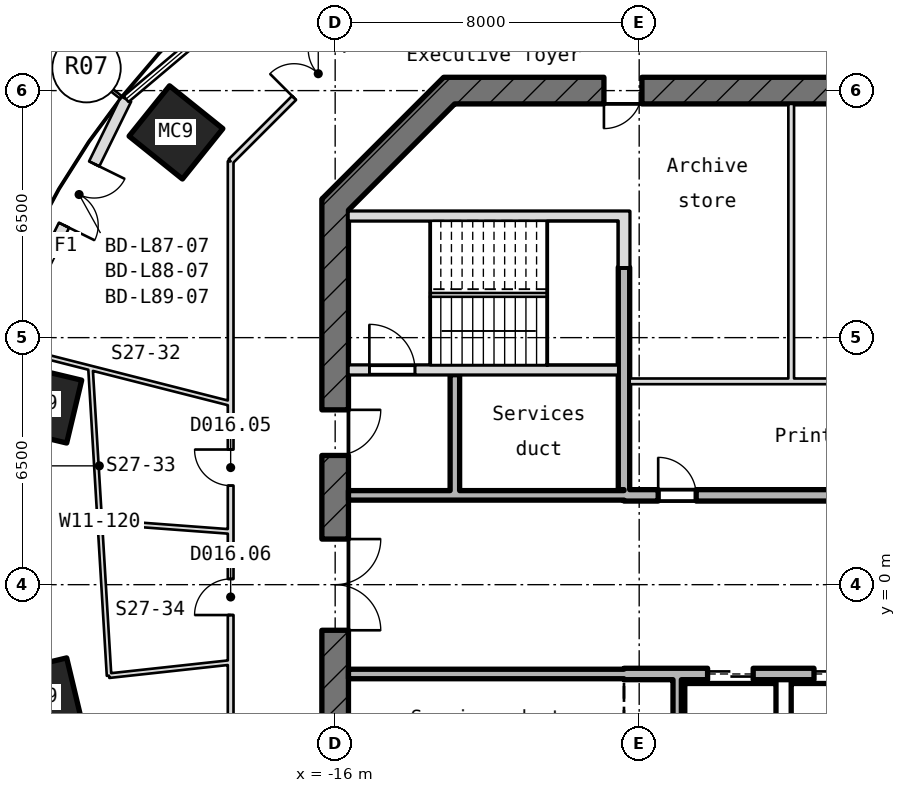
"""IFC4 building model, lengths in metres.
Left out: names, types, materials, properties, quantities, classifications, styles, units other than length and angle.
Written with IfcOpenShell. Run it as: python <this file> out.ifc"""

import sys

from ifc_helpers import new_model, si_unit, direction, frame, frame_2d, origin, origin_2d, place, context, subcontext, project, spatial, rectangle, hollow_rectangle, extrude, element, fill, save


model = new_model("IFC4")
c1 = context("Model", 3, precision=1e-05, world=origin(), true_north=direction((0.0, 1.0)))
c2 = subcontext(c1, "Body", "Model", "MODEL_VIEW")
j1 = project(units=[si_unit("LENGTHUNIT", "METRE"), si_unit("PLANEANGLEUNIT", "RADIAN")], contexts=[c1])
p1 = place(None, origin())
s1 = spatial("IfcSite", under=j1, at=p1, CompositionType="ELEMENT")
p2 = place(p1, origin())
s2 = spatial("IfcBuilding", under=s1, at=p2, CompositionType="ELEMENT")
p3 = place(p2, frame((0.0, 0.0, 384.1)))
s3 = spatial("IfcBuildingStorey", under=s2, at=p3, CompositionType="ELEMENT", Elevation=384.1)
for number, where, z_axis, x_axis in (
    (1, (-20.189, 11.9, -0.18), (0.0, 0.0, 1.0), (0.626, 0.78, 0.0)),
    (2, (-23.743, 4.763, -0.18), (0.0, 0.0, 1.0), (0.233, 0.973, 0.0)),
    (3, (-23.743, -2.963, -0.18), (0.0, 0.0, 1.0), (-0.233, 0.973, 0.0)),
):
    element("IfcColumn", number, at=place(p3, frame(where, z_axis=z_axis, x_axis=x_axis)), inside=s3, PredefinedType="COLUMN", context=c2, shape_type="SweptSolid", body=[
        extrude(hollow_rectangle(XDim=1.7, YDim=1.8, WallThickness=0.05, at=origin_2d()), origin(), (0.0, 0.0, 1.0), 4.15),
    ])
p4 = place(p3, frame((-21.503, 12.778, 0.0), z_axis=(0.0, 0.0, 1.0), x_axis=(-0.441245353493, -0.897386504256, 0.0)))
e4 = element("IfcWall", 4, at=p4, inside=s3, PredefinedType="SOLIDWALL", context=c2, shape_type="SweptSolid", body=[
    extrude(rectangle(XDim=8.588, YDim=0.3, at=frame_2d((4.294, 0.0))), origin(), (0.0, 0.0, 1.0), 3.97),
])
p5 = place(p4, frame((1.9, 0.0, 0.0)))
e5 = element("IfcOpeningElement", 5, at=p5, cuts=e4, PredefinedType="OPENING", context=c2, shape_type="SweptSolid", body=[
    extrude(rectangle(XDim=1.8, YDim=2.4, at=frame_2d((0.9, 1.2))), frame((0.0, 0.16, 0.0), z_axis=(0.0, -1.0, 0.0), x_axis=(1.0, 0.0, 0.0)), (0.0, 0.0, 1.0), 0.32),
])
p6 = place(p4, frame((4.3, 0.0, 0.9)))
e6 = element("IfcOpeningElement", 6, at=p6, cuts=e4, PredefinedType="OPENING", context=c2, shape_type="SweptSolid", body=[
    extrude(rectangle(XDim=1.6, YDim=1.5, at=frame_2d((0.8, 0.75))), frame((0.0, 0.16, 0.0), z_axis=(0.0, -1.0, 0.0), x_axis=(1.0, 0.0, 0.0)), (0.0, 0.0, 1.0), 0.32),
])
p7 = place(p3, frame((-25.292, -3.271, 0.0), z_axis=(0.0, 0.0, 1.0), x_axis=(0.441245353493, -0.897386504256, 0.0)))
e7 = element("IfcWall", 7, at=p7, inside=s3, PredefinedType="SOLIDWALL", context=c2, shape_type="SweptSolid", body=[
    extrude(rectangle(XDim=8.588, YDim=0.3, at=frame_2d((4.294, 0.0))), origin(), (0.0, 0.0, 1.0), 3.97),
])
p8 = place(p7, frame((1.9, 0.0, 0.0)))
e8 = element("IfcOpeningElement", 8, at=p8, cuts=e7, PredefinedType="OPENING", context=c2, shape_type="SweptSolid", body=[
    extrude(rectangle(XDim=1.8, YDim=2.4, at=frame_2d((0.9, 1.2))), frame((0.0, 0.16, 0.0), z_axis=(0.0, -1.0, 0.0), x_axis=(1.0, 0.0, 0.0)), (0.0, 0.0, 1.0), 0.32),
])
p9 = place(p7, frame((4.3, 0.0, 0.9)))
e9 = element("IfcOpeningElement", 9, at=p9, cuts=e7, PredefinedType="OPENING", context=c2, shape_type="SweptSolid", body=[
    extrude(rectangle(XDim=1.6, YDim=1.5, at=frame_2d((0.8, 0.75))), frame((0.0, 0.16, 0.0), z_axis=(0.0, -1.0, 0.0), x_axis=(1.0, 0.0, 0.0)), (0.0, 0.0, 1.0), 0.32),
])
p10 = place(p3, frame((13.145, 13.0, -0.18), z_axis=(0.0, 0.0, 1.0), x_axis=(-1.0, 0.0, 0.0)))
e10 = element("IfcWall", 10, at=p10, inside=s3, PredefinedType="SHEAR", context=c2, shape_type="SweptSolid", body=[
    extrude(rectangle(XDim=26.29, YDim=0.7, at=frame_2d((13.145, 0.0))), origin(), (0.0, 0.0, 1.0), 4.15),
])
p11 = place(p10, frame((21.073, 0.0, 0.18)))
e11 = element("IfcOpeningElement", 11, at=p11, cuts=e10, PredefinedType="OPENING", context=c2, shape_type="SweptSolid", body=[
    extrude(rectangle(XDim=1.0, YDim=2.1, at=frame_2d((0.5, 1.05))), frame((0.0, 0.36, 0.0), z_axis=(0.0, -1.0, 0.0), x_axis=(1.0, 0.0, 0.0)), (0.0, 0.0, 1.0), 0.72),
])
p12 = place(p10, frame((13.645, 0.0, 0.18)))
e12 = element("IfcOpeningElement", 12, at=p12, cuts=e10, PredefinedType="OPENING", context=c2, shape_type="SweptSolid", body=[
    extrude(rectangle(XDim=1.0, YDim=2.1, at=frame_2d((0.5, 1.05))), frame((0.0, 0.36, 0.0), z_axis=(0.0, -1.0, 0.0), x_axis=(1.0, 0.0, 0.0)), (0.0, 0.0, 1.0), 0.72),
])
p13 = place(p10, frame((7.395, 0.0, 0.18)))
e13 = element("IfcOpeningElement", 13, at=p13, cuts=e10, PredefinedType="OPENING", context=c2, shape_type="SweptSolid", body=[
    extrude(rectangle(XDim=1.0, YDim=2.1, at=frame_2d((0.5, 1.05))), frame((0.0, 0.36, 0.0), z_axis=(0.0, -1.0, 0.0), x_axis=(1.0, 0.0, 0.0)), (0.0, 0.0, 1.0), 0.72),
])
p14 = place(p10, frame((2.4, 0.0, 0.18)))
e14 = element("IfcOpeningElement", 14, at=p14, cuts=e10, PredefinedType="OPENING", context=c2, shape_type="SweptSolid", body=[
    extrude(rectangle(XDim=1.0, YDim=2.1, at=frame_2d((0.5, 1.05))), frame((0.0, 0.36, 0.0), z_axis=(0.0, -1.0, 0.0), x_axis=(1.0, 0.0, 0.0)), (0.0, 0.0, 1.0), 0.72),
])
p15 = place(p3, frame((-12.897, 13.103, -0.18), z_axis=(0.0, 0.0, 1.0), x_axis=(-0.707106781187, -0.707106781187, 0.0)))
e15 = element("IfcWall", 15, at=p15, inside=s3, PredefinedType="SHEAR", context=c2, shape_type="SweptSolid", body=[
    extrude(rectangle(XDim=4.533, YDim=0.7, at=frame_2d((2.266, 0.0))), origin(), (0.0, 0.0, 1.0), 4.15),
])
p16 = place(p3, frame((-16.0, 10.145, -0.18), z_axis=(0.0, 0.0, 1.0), x_axis=(0.0, -1.0, 0.0)))
e16 = element("IfcWall", 16, at=p16, inside=s3, PredefinedType="SHEAR", context=c2, shape_type="SweptSolid", body=[
    extrude(rectangle(XDim=20.29, YDim=0.7, at=frame_2d((10.145, 0.0))), origin(), (0.0, 0.0, 1.0), 4.15),
])
p17 = place(p16, frame((8.945, 0.0, 0.18)))
e17 = element("IfcOpeningElement", 17, at=p17, cuts=e16, PredefinedType="OPENING", context=c2, shape_type="SweptSolid", body=[
    extrude(rectangle(XDim=2.4, YDim=2.1, at=frame_2d((1.2, 1.05))), frame((0.0, 0.36, 0.0), z_axis=(0.0, -1.0, 0.0), x_axis=(1.0, 0.0, 0.0)), (0.0, 0.0, 1.0), 0.72),
])
p18 = place(p16, frame((5.545, 0.0, 0.18)))
e18 = element("IfcOpeningElement", 18, at=p18, cuts=e16, PredefinedType="OPENING", context=c2, shape_type="SweptSolid", body=[
    extrude(rectangle(XDim=1.2, YDim=2.1, at=frame_2d((0.6, 1.05))), frame((0.0, 0.36, 0.0), z_axis=(0.0, -1.0, 0.0), x_axis=(1.0, 0.0, 0.0)), (0.0, 0.0, 1.0), 0.72),
])
p19 = place(p3, frame((-15.65, -2.35, 0.0), z_axis=(0.0, 0.0, 1.0), x_axis=(1.0, 0.0, 0.0)))
e19 = element("IfcWall", 19, at=p19, inside=s3, PredefinedType="STANDARD", context=c2, shape_type="SweptSolid", body=[
    extrude(rectangle(XDim=7.25, YDim=0.25, at=frame_2d((3.625, 0.0))), origin(), (0.0, 0.0, 1.0), 3.97),
])
p20 = place(p3, frame((-8.4, -2.35, -0.18), z_axis=(0.0, 0.0, 1.0), x_axis=(1.0, 0.0, 0.0)))
e20 = element("IfcWall", 20, at=p20, inside=s3, PredefinedType="SHEAR", context=c2, shape_type="SweptSolid", body=[
    extrude(rectangle(XDim=16.8, YDim=0.3, at=frame_2d((8.4, 0.0))), origin(), (0.0, 0.0, 1.0), 4.15),
])
p21 = place(p20, frame((2.2, 0.0, 0.18)))
e21 = element("IfcOpeningElement", 21, at=p21, cuts=e20, PredefinedType="OPENING", context=c2, shape_type="SweptSolid", body=[
    extrude(rectangle(XDim=1.2, YDim=2.1, at=frame_2d((0.6, 1.05))), frame((0.0, 0.16, 0.0), z_axis=(0.0, -1.0, 0.0), x_axis=(1.0, 0.0, 0.0)), (0.0, 0.0, 1.0), 0.32),
])
p22 = place(p20, frame((5.0, 0.0, 0.18)))
e22 = element("IfcOpeningElement", 22, at=p22, cuts=e20, PredefinedType="OPENING", context=c2, shape_type="SweptSolid", body=[
    extrude(rectangle(XDim=1.2, YDim=2.1, at=frame_2d((0.6, 1.05))), frame((0.0, 0.16, 0.0), z_axis=(0.0, -1.0, 0.0), x_axis=(1.0, 0.0, 0.0)), (0.0, 0.0, 1.0), 0.32),
])
p23 = place(p20, frame((7.8, 0.0, 0.18)))
e23 = element("IfcOpeningElement", 23, at=p23, cuts=e20, PredefinedType="OPENING", context=c2, shape_type="SweptSolid", body=[
    extrude(rectangle(XDim=1.2, YDim=2.1, at=frame_2d((0.6, 1.05))), frame((0.0, 0.16, 0.0), z_axis=(0.0, -1.0, 0.0), x_axis=(1.0, 0.0, 0.0)), (0.0, 0.0, 1.0), 0.32),
])
p24 = place(p20, frame((10.6, 0.0, 0.18)))
e24 = element("IfcOpeningElement", 24, at=p24, cuts=e20, PredefinedType="OPENING", context=c2, shape_type="SweptSolid", body=[
    extrude(rectangle(XDim=1.2, YDim=2.1, at=frame_2d((0.6, 1.05))), frame((0.0, 0.16, 0.0), z_axis=(0.0, -1.0, 0.0), x_axis=(1.0, 0.0, 0.0)), (0.0, 0.0, 1.0), 0.32),
])
p25 = place(p20, frame((13.4, 0.0, 0.18)))
e25 = element("IfcOpeningElement", 25, at=p25, cuts=e20, PredefinedType="OPENING", context=c2, shape_type="SweptSolid", body=[
    extrude(rectangle(XDim=1.2, YDim=2.1, at=frame_2d((0.6, 1.05))), frame((0.0, 0.16, 0.0), z_axis=(0.0, -1.0, 0.0), x_axis=(1.0, 0.0, 0.0)), (0.0, 0.0, 1.0), 0.32),
])
p26 = place(p3, frame((-15.65, 2.35, 0.0), z_axis=(0.0, 0.0, 1.0), x_axis=(1.0, 0.0, 0.0)))
e26 = element("IfcWall", 26, at=p26, inside=s3, PredefinedType="STANDARD", context=c2, shape_type="SweptSolid", body=[
    extrude(rectangle(XDim=7.25, YDim=0.25, at=frame_2d((3.625, 0.0))), origin(), (0.0, 0.0, 1.0), 3.97),
])
p27 = place(p3, frame((-8.4, 2.35, -0.18), z_axis=(0.0, 0.0, 1.0), x_axis=(1.0, 0.0, 0.0)))
e27 = element("IfcWall", 27, at=p27, inside=s3, PredefinedType="SHEAR", context=c2, shape_type="SweptSolid", body=[
    extrude(rectangle(XDim=16.8, YDim=0.3, at=frame_2d((8.4, 0.0))), origin(), (0.0, 0.0, 1.0), 4.15),
])
p28 = place(p27, frame((0.9, 0.0, 0.18)))
e28 = element("IfcOpeningElement", 28, at=p28, cuts=e27, PredefinedType="OPENING", context=c2, shape_type="SweptSolid", body=[
    extrude(rectangle(XDim=1.0, YDim=2.1, at=frame_2d((0.5, 1.05))), frame((0.0, 0.16, 0.0), z_axis=(0.0, -1.0, 0.0), x_axis=(1.0, 0.0, 0.0)), (0.0, 0.0, 1.0), 0.32),
])
p29 = place(p27, frame((14.9, 0.0, 0.18)))
e29 = element("IfcOpeningElement", 29, at=p29, cuts=e27, PredefinedType="OPENING", context=c2, shape_type="SweptSolid", body=[
    extrude(rectangle(XDim=1.0, YDim=2.1, at=frame_2d((0.5, 1.05))), frame((0.0, 0.16, 0.0), z_axis=(0.0, -1.0, 0.0), x_axis=(1.0, 0.0, 0.0)), (0.0, 0.0, 1.0), 0.32),
])
p30 = place(p3, frame((-8.25, 5.35, 0.0), z_axis=(0.0, 0.0, 1.0), x_axis=(1.0, 0.0, 0.0)))
e30 = element("IfcWall", 30, at=p30, inside=s3, PredefinedType="PARTITIONING", context=c2, shape_type="SweptSolid", body=[
    extrude(rectangle(XDim=11.05, YDim=0.15, at=frame_2d((5.525, 0.0))), origin(), (0.0, 0.0, 1.0), 3.97),
])
p31 = place(p3, frame((-15.65, 5.65, -0.18), z_axis=(0.0, 0.0, 1.0), x_axis=(1.0, 0.0, 0.0)))
e31 = element("IfcWall", 31, at=p31, inside=s3, PredefinedType="SHEAR", context=c2, shape_type="SweptSolid", body=[
    extrude(rectangle(XDim=7.1, YDim=0.25, at=frame_2d((3.55, 0.0))), origin(), (0.0, 0.0, 1.0), 4.15),
])
p32 = place(p31, frame((0.55, 0.0, 0.18)))
e32 = element("IfcOpeningElement", 32, at=p32, cuts=e31, PredefinedType="OPENING", context=c2, shape_type="SweptSolid", body=[
    extrude(rectangle(XDim=1.2, YDim=2.1, at=frame_2d((0.6, 1.05))), frame((0.0, 0.135, 0.0), z_axis=(0.0, -1.0, 0.0), x_axis=(1.0, 0.0, 0.0)), (0.0, 0.0, 1.0), 0.27),
])
p33 = place(p3, frame((-15.65, 9.7, -0.18), z_axis=(0.0, 0.0, 1.0), x_axis=(1.0, 0.0, 0.0)))
e33 = element("IfcWall", 33, at=p33, inside=s3, PredefinedType="SHEAR", context=c2, shape_type="SweptSolid", body=[
    extrude(rectangle(XDim=7.1, YDim=0.25, at=frame_2d((3.55, 0.0))), origin(), (0.0, 0.0, 1.0), 4.15),
])
p34 = place(p3, frame((-12.85, 2.475, 0.0), z_axis=(0.0, 0.0, 1.0), x_axis=(0.0, 1.0, 0.0)))
e34 = element("IfcWall", 34, at=p34, inside=s3, PredefinedType="STANDARD", context=c2, shape_type="SweptSolid", body=[
    extrude(rectangle(XDim=3.05, YDim=0.25, at=frame_2d((1.525, 0.0))), origin(), (0.0, 0.0, 1.0), 3.97),
])
p35 = place(p3, frame((-8.4, 2.5, -0.18), z_axis=(0.0, 0.0, 1.0), x_axis=(0.0, 1.0, 0.0)))
e35 = element("IfcWall", 35, at=p35, inside=s3, PredefinedType="SHEAR", context=c2, shape_type="SweptSolid", body=[
    extrude(rectangle(XDim=5.85, YDim=0.3, at=frame_2d((2.925, 0.0))), origin(), (0.0, 0.0, 1.0), 4.15),
])
p36 = place(p3, frame((-8.4, 8.35, -0.18), z_axis=(0.0, 0.0, 1.0), x_axis=(0.0, 1.0, 0.0)))
e36 = element("IfcWall", 36, at=p36, inside=s3, PredefinedType="SHEAR", context=c2, shape_type="SweptSolid", body=[
    extrude(rectangle(XDim=1.475, YDim=0.3, at=frame_2d((0.737, 0.0))), origin(), (0.0, 0.0, 1.0), 4.15),
])
p37 = place(p3, frame((-7.0, -5.24, 0.0), z_axis=(0.0, 0.0, 1.0), x_axis=(0.0, 1.0, 0.0)))
e37 = element("IfcWall", 37, at=p37, inside=s3, PredefinedType="STANDARD", context=c2, shape_type="SweptSolid", body=[
    extrude(rectangle(XDim=2.74, YDim=0.22, at=frame_2d((1.37, 0.0))), origin(), (0.0, 0.0, 1.0), 3.97),
])
p38 = place(p3, frame((-4.0, 5.425, 0.0), z_axis=(0.0, 0.0, 1.0), x_axis=(0.0, 1.0, 0.0)))
e38 = element("IfcWall", 38, at=p38, inside=s3, PredefinedType="PARTITIONING", context=c2, shape_type="SweptSolid", body=[
    extrude(rectangle(XDim=7.225, YDim=0.15, at=frame_2d((3.612, 0.0))), origin(), (0.0, 0.0, 1.0), 3.97),
])
p39 = place(p3, frame((-22.438, 5.703, 0.0), z_axis=(0.0, 0.0, 1.0), x_axis=(0.060251539716, -0.998183225646, 0.0)))
e39 = element("IfcWall", 39, at=p39, inside=s3, PredefinedType="PARTITIONING", context=c2, shape_type="SweptSolid", body=[
    extrude(rectangle(XDim=8.112, YDim=0.12, at=frame_2d((4.056, 0.0))), origin(), (0.0, 0.0, 1.0), 3.97),
])
p40 = place(p3, frame((-22.194, 1.654, 0.0), z_axis=(0.0, 0.0, 1.0), x_axis=(0.997230984546, -0.074366413535, 0.0)))
e40 = element("IfcWall", 40, at=p40, inside=s3, PredefinedType="PARTITIONING", context=c2, shape_type="SweptSolid", body=[
    extrude(rectangle(XDim=3.454, YDim=0.12, at=frame_2d((1.727, 0.0))), origin(), (0.0, 0.0, 1.0), 3.97),
])
p41 = place(p3, frame((-21.95, -2.395, 0.0), z_axis=(0.0, 0.0, 1.0), x_axis=(0.994100094927, 0.10846659055, 0.0)))
e41 = element("IfcWall", 41, at=p41, inside=s3, PredefinedType="PARTITIONING", context=c2, shape_type="SweptSolid", body=[
    extrude(rectangle(XDim=3.219, YDim=0.12, at=frame_2d((1.609, 0.0))), origin(), (0.0, 0.0, 1.0), 3.97),
])
p42 = place(p3, frame((-18.75, -11.139, 0.0), z_axis=(0.0, 0.0, 1.0), x_axis=(0.0, 1.0, 0.0)))
e42 = element("IfcWall", 42, at=p42, inside=s3, PredefinedType="PARTITIONING", context=c2, shape_type="SweptSolid", body=[
    extrude(rectangle(XDim=22.278, YDim=0.15, at=frame_2d((11.139, 0.0))), origin(), (0.0, 0.0, 1.0), 3.97),
])
p43 = place(p42, frame((13.745, 0.0, 0.0)))
e43 = element("IfcOpeningElement", 43, at=p43, cuts=e42, PredefinedType="OPENING", context=c2, shape_type="SweptSolid", body=[
    extrude(rectangle(XDim=0.95, YDim=2.1, at=frame_2d((0.475, 1.05))), frame((0.0, 0.085, 0.0), z_axis=(0.0, -1.0, 0.0), x_axis=(1.0, 0.0, 0.0)), (0.0, 0.0, 1.0), 0.17),
])
p44 = place(p42, frame((10.34, 0.0, 0.0)))
e44 = element("IfcOpeningElement", 44, at=p44, cuts=e42, PredefinedType="OPENING", context=c2, shape_type="SweptSolid", body=[
    extrude(rectangle(XDim=0.95, YDim=2.1, at=frame_2d((0.475, 1.05))), frame((0.0, 0.085, 0.0), z_axis=(0.0, -1.0, 0.0), x_axis=(1.0, 0.0, 0.0)), (0.0, 0.0, 1.0), 0.17),
])
p45 = place(p3, frame((-18.75, 4.765, 0.0), z_axis=(0.0, 0.0, 1.0), x_axis=(-0.969189937919, 0.246314563589, 0.0)))
e45 = element("IfcWall", 45, at=p45, inside=s3, PredefinedType="PARTITIONING", context=c2, shape_type="SweptSolid", body=[
    extrude(rectangle(XDim=6.138, YDim=0.12, at=frame_2d((3.069, 0.0))), origin(), (0.0, 0.0, 1.0), 3.97),
])
p46 = place(p3, frame((-18.75, 11.139, 0.0), z_axis=(0.0, 0.0, 1.0), x_axis=(0.707106781187, 0.707106781187, 0.0)))
e46 = element("IfcWall", 46, at=p46, inside=s3, PredefinedType="PARTITIONING", context=c2, shape_type="SweptSolid", body=[
    extrude(rectangle(XDim=6.521, YDim=0.15, at=frame_2d((3.26, 0.0))), origin(), (0.0, 0.0, 1.0), 3.97),
])
p47 = place(p46, frame((2.36, 0.0, 0.0)))
e47 = element("IfcOpeningElement", 47, at=p47, cuts=e46, PredefinedType="OPENING", context=c2, shape_type="SweptSolid", body=[
    extrude(rectangle(XDim=1.8, YDim=2.1, at=frame_2d((0.9, 1.05))), frame((0.0, 0.085, 0.0), z_axis=(0.0, -1.0, 0.0), x_axis=(1.0, 0.0, 0.0)), (0.0, 0.0, 1.0), 0.17),
])
p48 = place(p5, origin())
e48 = element("IfcDoor", 48, at=p48, inside=s3, OperationType="SINGLE_SWING_LEFT", PredefinedType="DOOR", context=c2, shape_type="SweptSolid", body=[
    extrude(rectangle(XDim=1.8, YDim=2.4, at=frame_2d((0.9, 1.2))), frame((0.0, 0.025, 0.0), z_axis=(0.0, -1.0, 0.0), x_axis=(1.0, 0.0, 0.0)), (0.0, 0.0, 1.0), 0.05),
])
fill(e5, e48)
p49 = place(p6, origin())
e49 = element("IfcWindow", 49, at=p49, inside=s3, PartitioningType="SINGLE_PANEL", PredefinedType="WINDOW", context=c2, shape_type="SweptSolid", body=[
    extrude(rectangle(XDim=1.6, YDim=1.5, at=frame_2d((0.8, 0.75))), frame((0.0, 0.03, 0.0), z_axis=(0.0, -1.0, 0.0), x_axis=(1.0, 0.0, 0.0)), (0.0, 0.0, 1.0), 0.06),
])
fill(e6, e49)
p50 = place(p21, origin())
e50 = element("IfcDoor", 50, at=p50, inside=s3, OperationType="DOUBLE_DOOR_SLIDING", PredefinedType="DOOR", context=c2, shape_type="SweptSolid", body=[
    extrude(rectangle(XDim=1.2, YDim=2.1, at=frame_2d((0.6, 1.05))), frame((0.0, 0.025, 0.0), z_axis=(0.0, -1.0, 0.0), x_axis=(1.0, 0.0, 0.0)), (0.0, 0.0, 1.0), 0.05),
])
fill(e21, e50)
p51 = place(p22, origin())
e51 = element("IfcDoor", 51, at=p51, inside=s3, OperationType="DOUBLE_DOOR_SLIDING", PredefinedType="DOOR", context=c2, shape_type="SweptSolid", body=[
    extrude(rectangle(XDim=1.2, YDim=2.1, at=frame_2d((0.6, 1.05))), frame((0.0, 0.025, 0.0), z_axis=(0.0, -1.0, 0.0), x_axis=(1.0, 0.0, 0.0)), (0.0, 0.0, 1.0), 0.05),
])
fill(e22, e51)
p52 = place(p32, origin())
e52 = element("IfcDoor", 52, at=p52, inside=s3, OperationType="SINGLE_SWING_RIGHT", PredefinedType="DOOR", context=c2, shape_type="SweptSolid", body=[
    extrude(rectangle(XDim=1.2, YDim=2.1, at=frame_2d((0.6, 1.05))), frame((0.0, 0.025, 0.0), z_axis=(0.0, -1.0, 0.0), x_axis=(1.0, 0.0, 0.0)), (0.0, 0.0, 1.0), 0.05),
])
fill(e32, e52)
p53 = place(p17, origin())
e53 = element("IfcDoor", 53, at=p53, inside=s3, OperationType="DOUBLE_DOOR_SINGLE_SWING", PredefinedType="DOOR", context=c2, shape_type="SweptSolid", body=[
    extrude(rectangle(XDim=2.4, YDim=2.1, at=frame_2d((1.2, 1.05))), frame((0.0, 0.025, 0.0), z_axis=(0.0, -1.0, 0.0), x_axis=(1.0, 0.0, 0.0)), (0.0, 0.0, 1.0), 0.05),
])
fill(e17, e53)
p54 = place(p18, origin())
e54 = element("IfcDoor", 54, at=p54, inside=s3, OperationType="SINGLE_SWING_RIGHT", PredefinedType="DOOR", context=c2, shape_type="SweptSolid", body=[
    extrude(rectangle(XDim=1.2, YDim=2.1, at=frame_2d((0.6, 1.05))), frame((0.0, 0.025, 0.0), z_axis=(0.0, -1.0, 0.0), x_axis=(1.0, 0.0, 0.0)), (0.0, 0.0, 1.0), 0.05),
])
fill(e18, e54)
p55 = place(p28, origin())
e55 = element("IfcDoor", 55, at=p55, inside=s3, OperationType="SINGLE_SWING_RIGHT", PredefinedType="DOOR", context=c2, shape_type="SweptSolid", body=[
    extrude(rectangle(XDim=1.0, YDim=2.1, at=frame_2d((0.5, 1.05))), frame((0.0, 0.025, 0.0), z_axis=(0.0, -1.0, 0.0), x_axis=(1.0, 0.0, 0.0)), (0.0, 0.0, 1.0), 0.05),
])
fill(e28, e55)
p56 = place(p11, origin())
e56 = element("IfcDoor", 56, at=p56, inside=s3, OperationType="SINGLE_SWING_RIGHT", PredefinedType="DOOR", context=c2, shape_type="SweptSolid", body=[
    extrude(rectangle(XDim=1.0, YDim=2.1, at=frame_2d((0.5, 1.05))), frame((0.0, 0.025, 0.0), z_axis=(0.0, -1.0, 0.0), x_axis=(1.0, 0.0, 0.0)), (0.0, 0.0, 1.0), 0.05),
])
fill(e11, e56)
p57 = place(p47, origin())
e57 = element("IfcDoor", 57, at=p57, inside=s3, OperationType="DOUBLE_DOOR_SINGLE_SWING", PredefinedType="DOOR", context=c2, shape_type="SweptSolid", body=[
    extrude(rectangle(XDim=1.8, YDim=2.1, at=frame_2d((0.9, 1.05))), frame((0.0, 0.025, 0.0), z_axis=(0.0, -1.0, 0.0), x_axis=(1.0, 0.0, 0.0)), (0.0, 0.0, 1.0), 0.05),
])
fill(e47, e57)
p58 = place(p43, origin())
e58 = element("IfcDoor", 58, at=p58, inside=s3, OperationType="SINGLE_SWING_RIGHT", PredefinedType="DOOR", context=c2, shape_type="SweptSolid", body=[
    extrude(rectangle(XDim=0.95, YDim=2.1, at=frame_2d((0.475, 1.05))), frame((0.0, 0.025, 0.0), z_axis=(0.0, -1.0, 0.0), x_axis=(1.0, 0.0, 0.0)), (0.0, 0.0, 1.0), 0.05),
])
fill(e43, e58)
p59 = place(p44, origin())
e59 = element("IfcDoor", 59, at=p59, inside=s3, OperationType="SINGLE_SWING_RIGHT", PredefinedType="DOOR", context=c2, shape_type="SweptSolid", body=[
    extrude(rectangle(XDim=0.95, YDim=2.1, at=frame_2d((0.475, 1.05))), frame((0.0, 0.025, 0.0), z_axis=(0.0, -1.0, 0.0), x_axis=(1.0, 0.0, 0.0)), (0.0, 0.0, 1.0), 0.05),
])
fill(e44, e59)
save(model, sys.argv[1])
